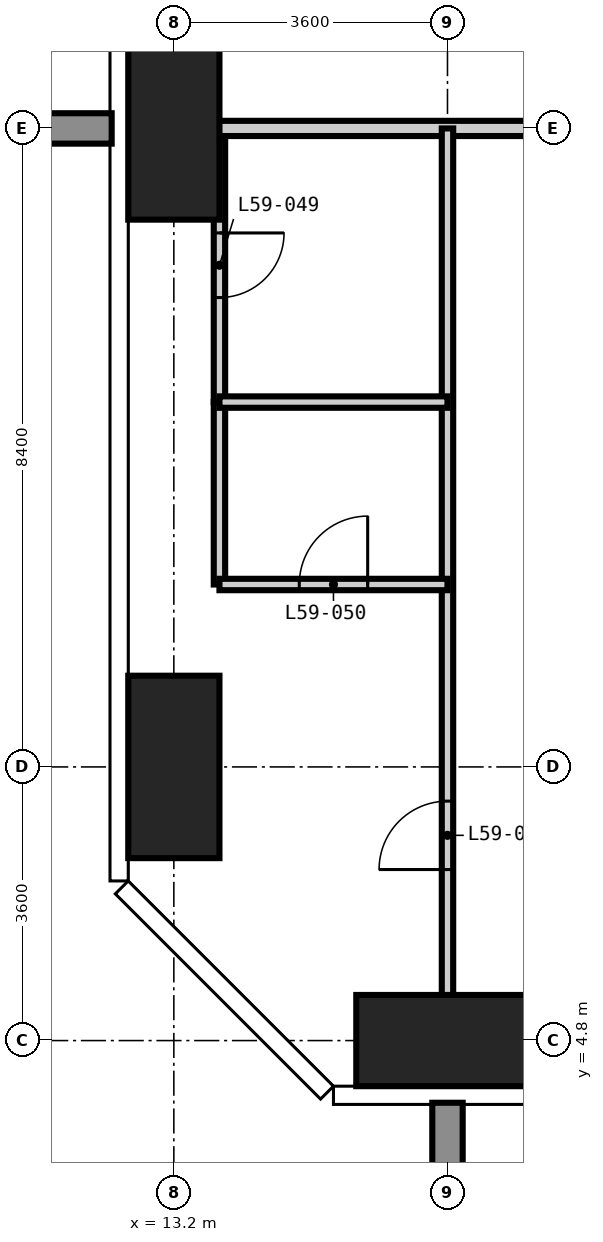
"""IFC4 building model, lengths in metres.
Left out: names, types, materials, properties, quantities, classifications, styles, units other than length and angle.
Written with IfcOpenShell. Run it as: python <this file> out.ifc"""

import sys

from ifc_helpers import new_model, si_unit, direction, frame, frame_2d, origin, origin_2d, place, context, subcontext, project, spatial, rectangle, extrude, element, fill, save


model = new_model("IFC4")
c1 = context("Model", 3, precision=1e-05, world=origin(), true_north=direction((0.0, 1.0)))
c2 = subcontext(c1, "Body", "Model", "MODEL_VIEW")
j1 = project(units=[si_unit("LENGTHUNIT", "METRE"), si_unit("PLANEANGLEUNIT", "RADIAN")], contexts=[c1])
p1 = place(None, origin())
s1 = spatial("IfcSite", under=j1, at=p1, CompositionType="ELEMENT")
p2 = place(p1, origin())
s2 = spatial("IfcBuilding", under=s1, at=p2, CompositionType="ELEMENT")
p3 = place(p2, frame((0.0, 0.0, 229.5)))
s3 = spatial("IfcBuildingStorey", under=s2, at=p3, CompositionType="ELEMENT", Elevation=229.5)
for number, where, z_axis, x_axis in (
    (1, (13.2, 8.4, -0.35), (0.0, 0.0, 1.0), (1.0, 0.0, 0.0)),
    (2, (13.2, 16.8, -0.35), (0.0, 0.0, 1.0), (1.0, 0.0, 0.0)),
):
    element("IfcColumn", number, at=place(p3, frame(where, z_axis=z_axis, x_axis=x_axis)), inside=s3, PredefinedType="COLUMN", context=c2, shape_type="SweptSolid", body=[
        extrude(rectangle(XDim=1.2, YDim=2.4, at=origin_2d()), origin(), (0.0, 0.0, 1.0), 3.9),
    ])
p4 = place(p3, frame((16.8, 4.8, -0.35), z_axis=(0.0, 0.0, 1.0), x_axis=(1.0, 0.0, 0.0)))
e3 = element("IfcColumn", 3, at=p4, inside=s3, PredefinedType="COLUMN", context=c2, shape_type="SweptSolid", body=[
    extrude(rectangle(XDim=2.4, YDim=1.2, at=origin_2d()), origin(), (0.0, 0.0, 1.0), 3.9),
])
p5 = place(p3, frame((13.8, 13.2, 0.0), z_axis=(0.0, 0.0, 1.0), x_axis=(0.0, 1.0, 0.0)))
e4 = element("IfcWall", 4, at=p5, inside=s3, PredefinedType="PARTITIONING", context=c2, shape_type="SweptSolid", body=[
    extrude(rectangle(XDim=3.6, YDim=0.15, at=frame_2d((1.8, 0.0))), origin(), (0.0, 0.0, 1.0), 3.55),
])
p6 = place(p5, frame((1.375, 0.0, 0.0)))
e5 = element("IfcOpeningElement", 5, at=p6, cuts=e4, PredefinedType="OPENING", context=c2, shape_type="SweptSolid", body=[
    extrude(rectangle(XDim=0.85, YDim=2.1, at=frame_2d((0.425, 1.05))), frame((0.0, 0.085, 0.0), z_axis=(0.0, -1.0, 0.0), x_axis=(1.0, 0.0, 0.0)), (0.0, 0.0, 1.0), 0.17),
])
p7 = place(p3, frame((12.582, 16.8, 0.0), z_axis=(0.0, 0.0, 1.0), x_axis=(1.0, 0.0, 0.0)))
e6 = element("IfcWall", 6, at=p7, inside=s3, PredefinedType="PARTITIONING", context=c2, shape_type="SweptSolid", body=[
    extrude(rectangle(XDim=8.743, YDim=0.2, at=frame_2d((4.372, 0.0))), origin(), (0.0, 0.0, 1.0), 3.55),
])
p8 = place(p3, frame((13.8, 10.8, 0.0), z_axis=(0.0, 0.0, 1.0), x_axis=(0.0, 1.0, 0.0)))
e7 = element("IfcWall", 7, at=p8, inside=s3, PredefinedType="PARTITIONING", context=c2, shape_type="SweptSolid", body=[
    extrude(rectangle(XDim=2.4, YDim=0.15, at=frame_2d((1.2, 0.0))), origin(), (0.0, 0.0, 1.0), 3.55),
])
p9 = place(p3, frame((16.8, 4.182, 0.0), z_axis=(0.0, 0.0, 1.0), x_axis=(0.0, 1.0, 0.0)))
e8 = element("IfcWall", 8, at=p9, inside=s3, PredefinedType="PARTITIONING", context=c2, shape_type="SweptSolid", body=[
    extrude(rectangle(XDim=12.618, YDim=0.15, at=frame_2d((6.309, 0.0))), origin(), (0.0, 0.0, 1.0), 3.55),
])
p10 = place(p9, frame((2.868, 0.0, 0.0)))
e9 = element("IfcOpeningElement", 9, at=p10, cuts=e8, PredefinedType="OPENING", context=c2, shape_type="SweptSolid", body=[
    extrude(rectangle(XDim=0.9, YDim=2.1, at=frame_2d((0.45, 1.05))), frame((0.0, 0.085, 0.0), z_axis=(0.0, -1.0, 0.0), x_axis=(1.0, 0.0, 0.0)), (0.0, 0.0, 1.0), 0.17),
])
p11 = place(p3, frame((13.8, 10.8, 0.0), z_axis=(0.0, 0.0, 1.0), x_axis=(1.0, 0.0, 0.0)))
e10 = element("IfcWall", 10, at=p11, inside=s3, PredefinedType="PARTITIONING", context=c2, shape_type="SweptSolid", body=[
    extrude(rectangle(XDim=3.0, YDim=0.15, at=frame_2d((1.5, 0.0))), origin(), (0.0, 0.0, 1.0), 3.55),
])
p12 = place(p11, frame((1.05, 0.0, 0.0)))
e11 = element("IfcOpeningElement", 11, at=p12, cuts=e10, PredefinedType="OPENING", context=c2, shape_type="SweptSolid", body=[
    extrude(rectangle(XDim=0.9, YDim=2.1, at=frame_2d((0.45, 1.05))), frame((0.0, 0.085, 0.0), z_axis=(0.0, -1.0, 0.0), x_axis=(1.0, 0.0, 0.0)), (0.0, 0.0, 1.0), 0.17),
])
p13 = place(p3, frame((13.8, 13.2, 0.0), z_axis=(0.0, 0.0, 1.0), x_axis=(1.0, 0.0, 0.0)))
e12 = element("IfcWall", 12, at=p13, inside=s3, PredefinedType="PARTITIONING", context=c2, shape_type="SweptSolid", body=[
    extrude(rectangle(XDim=3.0, YDim=0.15, at=frame_2d((1.5, 0.0))), origin(), (0.0, 0.0, 1.0), 3.55),
])
p14 = place(p10, origin())
e13 = element("IfcDoor", 13, at=p14, inside=s3, OperationType="SINGLE_SWING_LEFT", PredefinedType="DOOR", context=c2, shape_type="SweptSolid", body=[
    extrude(rectangle(XDim=0.9, YDim=2.1, at=frame_2d((0.45, 1.05))), frame((0.0, 0.025, 0.0), z_axis=(0.0, -1.0, 0.0), x_axis=(1.0, 0.0, 0.0)), (0.0, 0.0, 1.0), 0.05),
])
fill(e9, e13)
p15 = place(p6, frame((0.85, 0.0, 0.0), z_axis=(0.0, 0.0, 1.0), x_axis=(-1.0, 0.0, 0.0)))
e14 = element("IfcDoor", 14, at=p15, inside=s3, OperationType="SINGLE_SWING_LEFT", PredefinedType="DOOR", context=c2, shape_type="SweptSolid", body=[
    extrude(rectangle(XDim=0.85, YDim=2.1, at=frame_2d((0.425, 1.05))), frame((0.0, 0.025, 0.0), z_axis=(0.0, -1.0, 0.0), x_axis=(1.0, 0.0, 0.0)), (0.0, 0.0, 1.0), 0.05),
])
fill(e5, e14)
p16 = place(p12, origin())
e15 = element("IfcDoor", 15, at=p16, inside=s3, OperationType="SINGLE_SWING_RIGHT", PredefinedType="DOOR", context=c2, shape_type="SweptSolid", body=[
    extrude(rectangle(XDim=0.9, YDim=2.1, at=frame_2d((0.45, 1.05))), frame((0.0, 0.025, 0.0), z_axis=(0.0, -1.0, 0.0), x_axis=(1.0, 0.0, 0.0)), (0.0, 0.0, 1.0), 0.05),
])
fill(e11, e15)
save(model, sys.argv[1])
